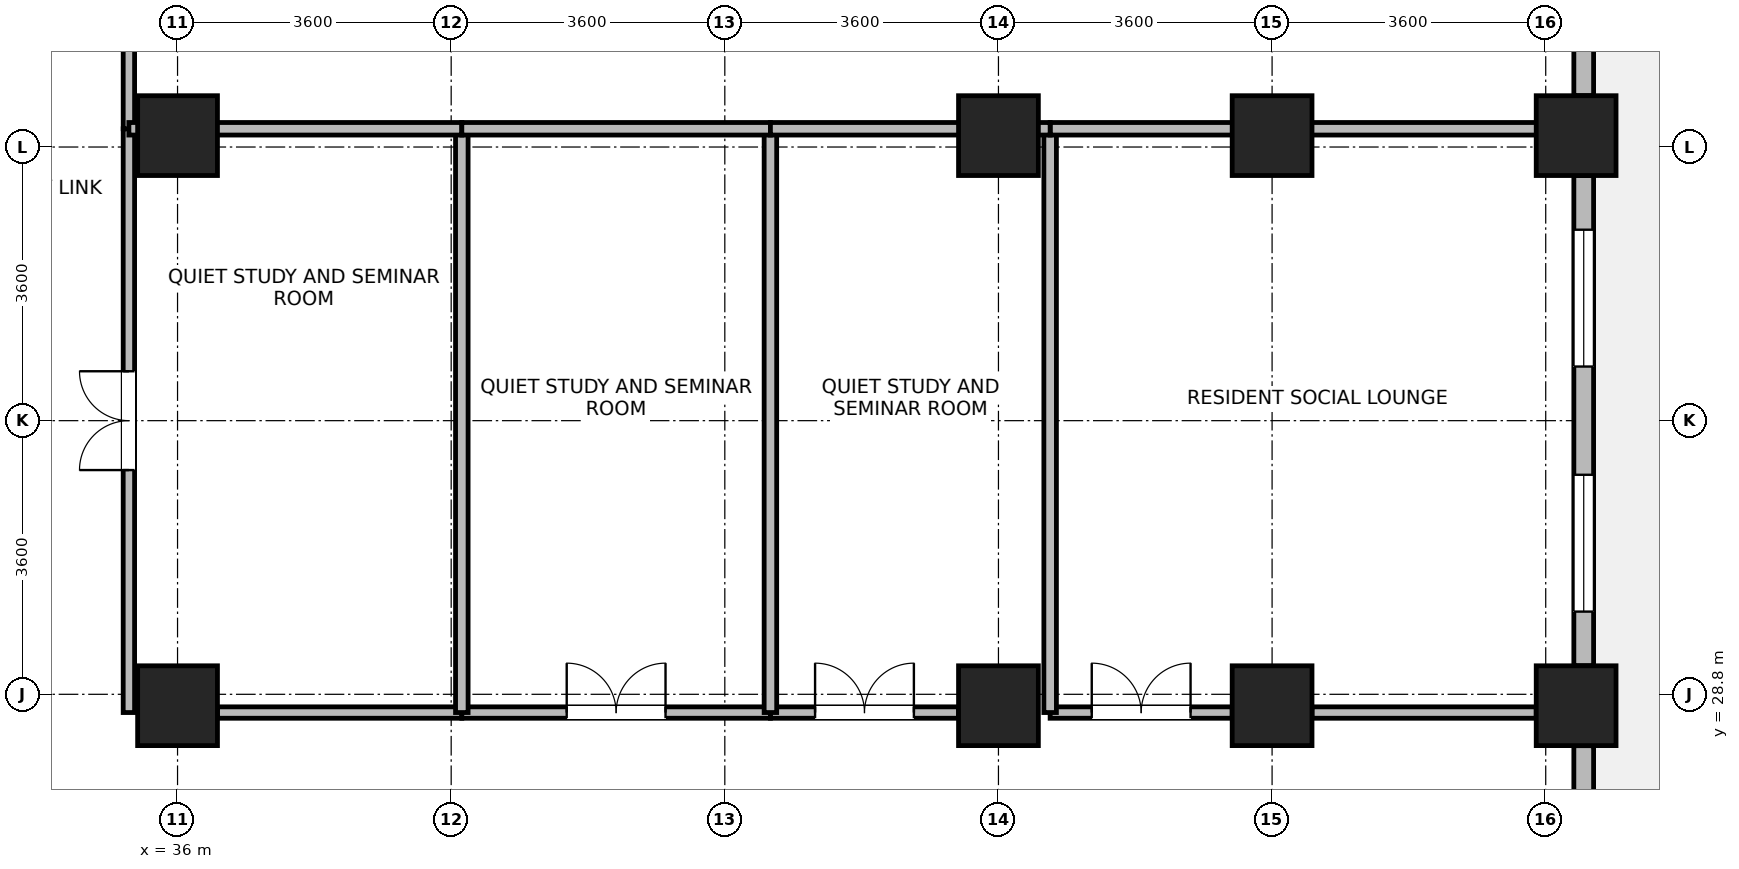
"""IFC4 building model, lengths in metres.
Left out: names, types, materials, properties, quantities, classifications, styles, units other than length and angle.
Written with IfcOpenShell. Run it as: python <this file> out.ifc"""

import sys

from ifc_helpers import new_model, si_unit, direction, frame, frame_2d, origin, origin_2d, place, context, subcontext, project, spatial, rectangle, extrude, source, transform, mapped, element, fill, save


model = new_model("IFC4")
c1 = context("Model", 3, precision=1e-05, world=origin(), true_north=direction((0.0, 1.0)))
c2 = subcontext(c1, "Body", "Model", "MODEL_VIEW")
j1 = project(units=[si_unit("LENGTHUNIT", "METRE"), si_unit("PLANEANGLEUNIT", "RADIAN")], contexts=[c1])
p1 = place(None, origin())
s1 = spatial("IfcSite", under=j1, at=p1, CompositionType="ELEMENT")
p2 = place(p1, origin())
s2 = spatial("IfcBuilding", under=s1, at=p2, CompositionType="ELEMENT")
p3 = place(p2, frame((0.0, 0.0, 143.9)))
s3 = spatial("IfcBuildingStorey", under=s2, at=p3, CompositionType="ELEMENT", Elevation=143.9)
m1 = source(origin(), c2, "Body", "SweptSolid", [
    extrude(rectangle(XDim=1.05, YDim=1.05, at=origin_2d()), origin(), (0.0, 0.0, 1.0), 3.7),
])
for number, where, z_axis, x_axis in (
    (1, (36.0, 28.65, 0.0), (0.0, 0.0, 1.0), (1.0, 0.0, 0.0)),
    (2, (36.0, 36.15, 0.0), (0.0, 0.0, 1.0), (1.0, 0.0, 0.0)),
    (3, (46.8, 28.65, 0.0), (0.0, 0.0, 1.0), (1.0, 0.0, 0.0)),
    (4, (46.8, 36.15, 0.0), (0.0, 0.0, 1.0), (1.0, 0.0, 0.0)),
    (5, (50.4, 28.65, 0.0), (0.0, 0.0, 1.0), (1.0, 0.0, 0.0)),
    (6, (50.4, 36.15, 0.0), (0.0, 0.0, 1.0), (1.0, 0.0, 0.0)),
    (7, (54.4, 28.65, 0.0), (0.0, 0.0, 1.0), (1.0, 0.0, 0.0)),
    (8, (54.4, 36.15, 0.0), (0.0, 0.0, 1.0), (1.0, 0.0, 0.0)),
):
    element("IfcColumn", number, at=place(p3, frame(where, z_axis=z_axis, x_axis=x_axis)), inside=s3, PredefinedType="COLUMN", context=c2, shape_type="MappedRepresentation", body=[
        mapped(m1, transform((0.0, 0.0, 0.0), x_axis=(1.0, 0.0, 0.0), y_axis=(0.0, 1.0, 0.0), z_axis=(0.0, 0.0, 1.0), scale=1.0)),
    ])
p4 = place(p3, frame((54.5, 28.124, 0.0), z_axis=(0.0, 0.0, 1.0), x_axis=(0.0, -1.0, 0.0)))
e9 = element("IfcWall", 9, at=p4, inside=s3, PredefinedType="STANDARD", context=c2, shape_type="SweptSolid", body=[
    extrude(rectangle(XDim=5.998, YDim=0.26, at=frame_2d((2.999, 0.0))), origin(), (0.0, 0.0, 1.0), 2.99),
])
p5 = place(p4, frame((3.598, 0.0, 0.85)))
e10 = element("IfcOpeningElement", 10, at=p5, cuts=e9, PredefinedType="OPENING", context=c2, shape_type="SweptSolid", body=[
    extrude(rectangle(XDim=1.8, YDim=1.85, at=frame_2d((0.9, 0.925))), frame((0.0, 0.14, 0.0), z_axis=(0.0, -1.0, 0.0), x_axis=(1.0, 0.0, 0.0)), (0.0, 0.0, 1.0), 0.28),
])
p6 = place(p4, frame((2.044, 0.0, 0.85)))
e11 = element("IfcOpeningElement", 11, at=p6, cuts=e9, PredefinedType="OPENING", context=c2, shape_type="SweptSolid", body=[
    extrude(rectangle(XDim=0.95, YDim=1.75, at=frame_2d((0.475, 0.875))), frame((0.0, 0.14, 0.0), z_axis=(0.0, -1.0, 0.0), x_axis=(1.0, 0.0, 0.0)), (0.0, 0.0, 1.0), 0.28),
])
p7 = place(p3, frame((54.5, 35.624, 0.0), z_axis=(0.0, 0.0, 1.0), x_axis=(0.0, -1.0, 0.0)))
e12 = element("IfcWall", 12, at=p7, inside=s3, PredefinedType="STANDARD", context=c2, shape_type="SweptSolid", body=[
    extrude(rectangle(XDim=6.448, YDim=0.26, at=frame_2d((3.224, 0.0))), origin(), (0.0, 0.0, 1.0), 2.99),
])
p8 = place(p7, frame((0.712, 0.0, 0.85)))
e13 = element("IfcOpeningElement", 13, at=p8, cuts=e12, PredefinedType="OPENING", context=c2, shape_type="SweptSolid", body=[
    extrude(rectangle(XDim=1.8, YDim=1.85, at=frame_2d((0.9, 0.925))), frame((0.0, 0.14, 0.0), z_axis=(0.0, -1.0, 0.0), x_axis=(1.0, 0.0, 0.0)), (0.0, 0.0, 1.0), 0.28),
])
p9 = place(p7, frame((3.936, 0.0, 0.85)))
e14 = element("IfcOpeningElement", 14, at=p9, cuts=e12, PredefinedType="OPENING", context=c2, shape_type="SweptSolid", body=[
    extrude(rectangle(XDim=1.8, YDim=1.85, at=frame_2d((0.9, 0.925))), frame((0.0, 0.14, 0.0), z_axis=(0.0, -1.0, 0.0), x_axis=(1.0, 0.0, 0.0)), (0.0, 0.0, 1.0), 0.28),
])
p10 = place(p3, frame((54.5, 43.33, 0.0), z_axis=(0.0, 0.0, 1.0), x_axis=(0.0, -1.0, 0.0)))
e15 = element("IfcWall", 15, at=p10, inside=s3, PredefinedType="STANDARD", context=c2, shape_type="SweptSolid", body=[
    extrude(rectangle(XDim=6.654, YDim=0.26, at=frame_2d((3.327, 0.0))), origin(), (0.0, 0.0, 1.0), 3.44),
])
p11 = place(p10, frame((0.763, 0.0, 0.85)))
e16 = element("IfcOpeningElement", 16, at=p11, cuts=e15, PredefinedType="OPENING", context=c2, shape_type="SweptSolid", body=[
    extrude(rectangle(XDim=1.8, YDim=1.85, at=frame_2d((0.9, 0.925))), frame((0.0, 0.14, 0.0), z_axis=(0.0, -1.0, 0.0), x_axis=(1.0, 0.0, 0.0)), (0.0, 0.0, 1.0), 0.28),
])
p12 = place(p10, frame((4.091, 0.0, 0.85)))
e17 = element("IfcOpeningElement", 17, at=p12, cuts=e15, PredefinedType="OPENING", context=c2, shape_type="SweptSolid", body=[
    extrude(rectangle(XDim=1.8, YDim=1.85, at=frame_2d((0.9, 0.925))), frame((0.0, 0.14, 0.0), z_axis=(0.0, -1.0, 0.0), x_axis=(1.0, 0.0, 0.0)), (0.0, 0.0, 1.0), 0.28),
])
p13 = place(p3, frame((35.36, 28.56, 0.0), z_axis=(0.0, 0.0, 1.0), x_axis=(0.0, 1.0, 0.0)))
e18 = element("IfcWall", 18, at=p13, inside=s3, PredefinedType="PARTITIONING", context=c2, shape_type="SweptSolid", body=[
    extrude(rectangle(XDim=7.68, YDim=0.15, at=frame_2d((3.84, 0.0))), origin(), (0.0, 0.0, 1.0), 3.44),
])
p14 = place(p13, frame((3.19, 0.0, 0.0)))
e19 = element("IfcOpeningElement", 19, at=p14, cuts=e18, PredefinedType="OPENING", context=c2, shape_type="SweptSolid", body=[
    extrude(rectangle(XDim=1.3, YDim=2.12, at=frame_2d((0.65, 1.06))), frame((0.0, 0.085, 0.0), z_axis=(0.0, -1.0, 0.0), x_axis=(1.0, 0.0, 0.0)), (0.0, 0.0, 1.0), 0.17),
])
p15 = place(p3, frame((47.48, 28.56, 0.0), z_axis=(0.0, 0.0, 1.0), x_axis=(1.0, 0.0, 0.0)))
e20 = element("IfcWall", 20, at=p15, inside=s3, PredefinedType="PARTITIONING", context=c2, shape_type="SweptSolid", body=[
    extrude(rectangle(XDim=2.395, YDim=0.15, at=frame_2d((1.198, 0.0))), origin(), (0.0, 0.0, 1.0), 2.84),
])
p16 = place(p15, frame((0.548, 0.0, 0.0)))
e21 = element("IfcOpeningElement", 21, at=p16, cuts=e20, PredefinedType="OPENING", context=c2, shape_type="SweptSolid", body=[
    extrude(rectangle(XDim=1.3, YDim=2.12, at=frame_2d((0.65, 1.06))), frame((0.0, 0.085, 0.0), z_axis=(0.0, -1.0, 0.0), x_axis=(1.0, 0.0, 0.0)), (0.0, 0.0, 1.0), 0.17),
])
p17 = place(p3, frame((50.925, 28.56, 0.0), z_axis=(0.0, 0.0, 1.0), x_axis=(1.0, 0.0, 0.0)))
e22 = element("IfcWall", 22, at=p17, inside=s3, PredefinedType="PARTITIONING", context=c2, shape_type="SweptSolid", body=[
    extrude(rectangle(XDim=2.95, YDim=0.15, at=frame_2d((1.475, 0.0))), origin(), (0.0, 0.0, 1.0), 2.84),
])
p18 = place(p3, frame((36.525, 28.56, 0.0), z_axis=(0.0, 0.0, 1.0), x_axis=(1.0, 0.0, 0.0)))
e23 = element("IfcWall", 23, at=p18, inside=s3, PredefinedType="PARTITIONING", context=c2, shape_type="SweptSolid", body=[
    extrude(rectangle(XDim=3.215, YDim=0.15, at=frame_2d((1.607, 0.0))), origin(), (0.0, 0.0, 1.0), 2.84),
])
p19 = place(p3, frame((39.74, 28.56, 0.0), z_axis=(0.0, 0.0, 1.0), x_axis=(1.0, 0.0, 0.0)))
e24 = element("IfcWall", 24, at=p19, inside=s3, PredefinedType="PARTITIONING", context=c2, shape_type="SweptSolid", body=[
    extrude(rectangle(XDim=4.06, YDim=0.15, at=frame_2d((2.03, 0.0))), origin(), (0.0, 0.0, 1.0), 2.84),
])
p20 = place(p19, frame((1.38, 0.0, 0.0)))
e25 = element("IfcOpeningElement", 25, at=p20, cuts=e24, PredefinedType="OPENING", context=c2, shape_type="SweptSolid", body=[
    extrude(rectangle(XDim=1.3, YDim=2.12, at=frame_2d((0.65, 1.06))), frame((0.0, 0.085, 0.0), z_axis=(0.0, -1.0, 0.0), x_axis=(1.0, 0.0, 0.0)), (0.0, 0.0, 1.0), 0.17),
])
p21 = place(p3, frame((43.8, 28.56, 0.0), z_axis=(0.0, 0.0, 1.0), x_axis=(1.0, 0.0, 0.0)))
e26 = element("IfcWall", 26, at=p21, inside=s3, PredefinedType="PARTITIONING", context=c2, shape_type="SweptSolid", body=[
    extrude(rectangle(XDim=2.475, YDim=0.15, at=frame_2d((1.237, 0.0))), origin(), (0.0, 0.0, 1.0), 2.84),
])
p22 = place(p21, frame((0.587, 0.0, 0.0)))
e27 = element("IfcOpeningElement", 27, at=p22, cuts=e26, PredefinedType="OPENING", context=c2, shape_type="SweptSolid", body=[
    extrude(rectangle(XDim=1.3, YDim=2.12, at=frame_2d((0.65, 1.06))), frame((0.0, 0.085, 0.0), z_axis=(0.0, -1.0, 0.0), x_axis=(1.0, 0.0, 0.0)), (0.0, 0.0, 1.0), 0.17),
])
p23 = place(p3, frame((35.36, 36.24, 0.0), z_axis=(0.0, 0.0, 1.0), x_axis=(0.0, 1.0, 0.0)))
e28 = element("IfcWall", 28, at=p23, inside=s3, PredefinedType="PARTITIONING", context=c2, shape_type="SweptSolid", body=[
    extrude(rectangle(XDim=1.96, YDim=0.15, at=frame_2d((0.98, 0.0))), origin(), (0.0, 0.0, 1.0), 3.44),
])
for number, where, z_axis, x_axis in (
    (29, (39.74, 28.56, 0.0), (0.0, 0.0, 1.0), (0.0, 1.0, 0.0)),
    (30, (43.8, 28.56, 0.0), (0.0, 0.0, 1.0), (0.0, 1.0, 0.0)),
    (31, (47.48, 28.56, 0.0), (0.0, 0.0, 1.0), (0.0, 1.0, 0.0)),
):
    element("IfcWall", number, at=place(p3, frame(where, z_axis=z_axis, x_axis=x_axis)), inside=s3, PredefinedType="PARTITIONING", context=c2, shape_type="SweptSolid", body=[
        extrude(rectangle(XDim=7.68, YDim=0.165, at=frame_2d((3.84, 0.0))), origin(), (0.0, 0.0, 1.0), 3.44),
    ])
p24 = place(p3, frame((47.48, 36.24, 0.0), z_axis=(0.0, 0.0, 1.0), x_axis=(1.0, 0.0, 0.0)))
e32 = element("IfcWall", 32, at=p24, inside=s3, PredefinedType="PARTITIONING", context=c2, shape_type="SweptSolid", body=[
    extrude(rectangle(XDim=6.888, YDim=0.165, at=frame_2d((3.444, 0.0))), origin(), (0.0, 0.0, 1.0), 2.84),
])
p25 = place(p3, frame((35.36, 36.24, 0.0), z_axis=(0.0, 0.0, 1.0), x_axis=(1.0, 0.0, 0.0)))
e33 = element("IfcWall", 33, at=p25, inside=s3, PredefinedType="PARTITIONING", context=c2, shape_type="SweptSolid", body=[
    extrude(rectangle(XDim=4.38, YDim=0.165, at=frame_2d((2.19, 0.0))), origin(), (0.0, 0.0, 1.0), 2.84),
])
p26 = place(p3, frame((39.74, 36.24, 0.0), z_axis=(0.0, 0.0, 1.0), x_axis=(1.0, 0.0, 0.0)))
e34 = element("IfcWall", 34, at=p26, inside=s3, PredefinedType="PARTITIONING", context=c2, shape_type="SweptSolid", body=[
    extrude(rectangle(XDim=4.06, YDim=0.165, at=frame_2d((2.03, 0.0))), origin(), (0.0, 0.0, 1.0), 2.84),
])
p27 = place(p3, frame((43.8, 36.24, 0.0), z_axis=(0.0, 0.0, 1.0), x_axis=(1.0, 0.0, 0.0)))
e35 = element("IfcWall", 35, at=p27, inside=s3, PredefinedType="PARTITIONING", context=c2, shape_type="SweptSolid", body=[
    extrude(rectangle(XDim=3.68, YDim=0.165, at=frame_2d((1.84, 0.0))), origin(), (0.0, 0.0, 1.0), 2.84),
])
p28 = place(p8, origin())
e36 = element("IfcWindow", 36, at=p28, inside=s3, PartitioningType="SINGLE_PANEL", PredefinedType="WINDOW", context=c2, shape_type="SweptSolid", body=[
    extrude(rectangle(XDim=1.8, YDim=1.85, at=frame_2d((0.9, 0.925))), frame((0.0, 0.03, 0.0), z_axis=(0.0, -1.0, 0.0), x_axis=(1.0, 0.0, 0.0)), (0.0, 0.0, 1.0), 0.06),
])
fill(e13, e36)
p29 = place(p9, origin())
e37 = element("IfcWindow", 37, at=p29, inside=s3, PartitioningType="SINGLE_PANEL", PredefinedType="WINDOW", context=c2, shape_type="SweptSolid", body=[
    extrude(rectangle(XDim=1.8, YDim=1.85, at=frame_2d((0.9, 0.925))), frame((0.0, 0.03, 0.0), z_axis=(0.0, -1.0, 0.0), x_axis=(1.0, 0.0, 0.0)), (0.0, 0.0, 1.0), 0.06),
])
fill(e14, e37)
p30 = place(p14, origin())
e38 = element("IfcDoor", 38, at=p30, inside=s3, OperationType="DOUBLE_DOOR_SINGLE_SWING", PredefinedType="DOOR", context=c2, shape_type="SweptSolid", body=[
    extrude(rectangle(XDim=1.3, YDim=2.12, at=frame_2d((0.65, 1.06))), frame((0.0, 0.025, 0.0), z_axis=(0.0, -1.0, 0.0), x_axis=(1.0, 0.0, 0.0)), (0.0, 0.0, 1.0), 0.05),
])
fill(e19, e38)
p31 = place(p16, origin())
e39 = element("IfcDoor", 39, at=p31, inside=s3, OperationType="DOUBLE_DOOR_SINGLE_SWING", PredefinedType="DOOR", context=c2, shape_type="SweptSolid", body=[
    extrude(rectangle(XDim=1.3, YDim=2.12, at=frame_2d((0.65, 1.06))), frame((0.0, 0.025, 0.0), z_axis=(0.0, -1.0, 0.0), x_axis=(1.0, 0.0, 0.0)), (0.0, 0.0, 1.0), 0.05),
])
fill(e21, e39)
p32 = place(p20, origin())
e40 = element("IfcDoor", 40, at=p32, inside=s3, OperationType="DOUBLE_DOOR_SINGLE_SWING", PredefinedType="DOOR", context=c2, shape_type="SweptSolid", body=[
    extrude(rectangle(XDim=1.3, YDim=2.12, at=frame_2d((0.65, 1.06))), frame((0.0, 0.025, 0.0), z_axis=(0.0, -1.0, 0.0), x_axis=(1.0, 0.0, 0.0)), (0.0, 0.0, 1.0), 0.05),
])
fill(e25, e40)
p33 = place(p22, origin())
e41 = element("IfcDoor", 41, at=p33, inside=s3, OperationType="DOUBLE_DOOR_SINGLE_SWING", PredefinedType="DOOR", context=c2, shape_type="SweptSolid", body=[
    extrude(rectangle(XDim=1.3, YDim=2.12, at=frame_2d((0.65, 1.06))), frame((0.0, 0.025, 0.0), z_axis=(0.0, -1.0, 0.0), x_axis=(1.0, 0.0, 0.0)), (0.0, 0.0, 1.0), 0.05),
])
fill(e27, e41)
save(model, sys.argv[1])
